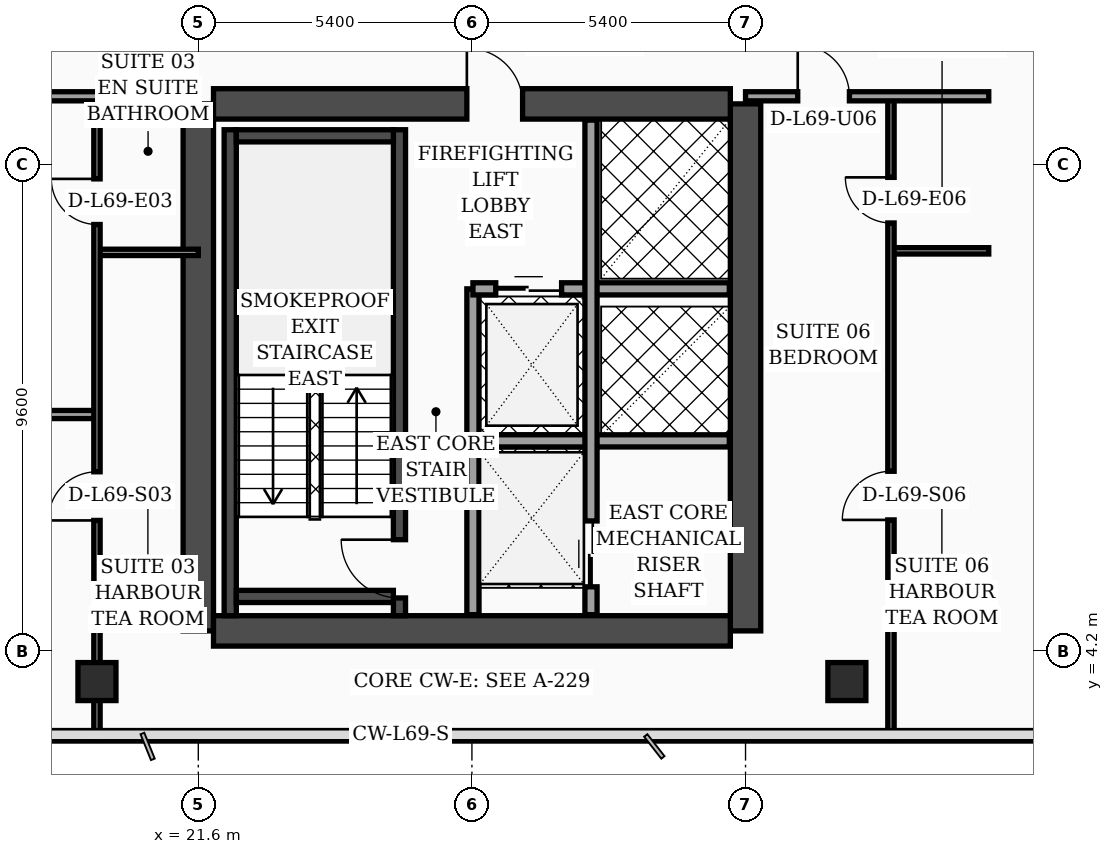
"""IFC4 building model, lengths in metres.
Left out: names, types, materials, properties, quantities, classifications, styles, units other than length and angle.
Written with IfcOpenShell. Run it as: python <this file> out.ifc"""

import sys

from ifc_helpers import new_model, si_unit, direction, frame, frame_2d, origin, origin_2d, place, context, subcontext, project, spatial, rectangle, hollow_rectangle, extrude, element, fill, save


model = new_model("IFC4")
c1 = context("Model", 3, precision=1e-05, world=origin(), true_north=direction((0.0, 1.0)))
c2 = subcontext(c1, "Body", "Model", "MODEL_VIEW")
j1 = project(units=[si_unit("LENGTHUNIT", "METRE"), si_unit("PLANEANGLEUNIT", "RADIAN")], contexts=[c1])
p1 = place(None, origin())
s1 = spatial("IfcSite", under=j1, at=p1, CompositionType="ELEMENT")
p2 = place(p1, origin())
s2 = spatial("IfcBuilding", under=s1, at=p2, CompositionType="ELEMENT")
p3 = place(p2, frame((0.0, 0.0, 278.7)))
s3 = spatial("IfcBuildingStorey", under=s2, at=p3, CompositionType="ELEMENT", Elevation=278.7)
for number, where, z_axis, x_axis in (
    (1, (21.6, 4.6, 0.0), (0.0, 0.0, 1.0), (0.0, 1.0, 0.0)),
    (2, (32.4, 4.6, 0.0), (0.0, 0.0, 1.0), (0.0, 1.0, 0.0)),
):
    element("IfcWall", number, at=place(p3, frame(where, z_axis=z_axis, x_axis=x_axis)), inside=s3, PredefinedType="SHEAR", context=c2, shape_type="SweptSolid", body=[
        extrude(rectangle(XDim=10.4, YDim=0.6, at=frame_2d((5.2, 0.0))), origin(), (0.0, 0.0, 1.0), 3.52),
    ])
p4 = place(p3, frame((21.9, 15.0, 0.0), z_axis=(0.0, 0.0, 1.0), x_axis=(1.0, 0.0, 0.0)))
e3 = element("IfcWall", 3, at=p4, inside=s3, PredefinedType="SHEAR", context=c2, shape_type="SweptSolid", body=[
    extrude(rectangle(XDim=10.2, YDim=0.6, at=frame_2d((5.1, 0.0))), origin(), (0.0, 0.0, 1.0), 3.52),
])
p5 = place(p4, frame((5.0, 0.0, 0.0)))
e4 = element("IfcOpeningElement", 4, at=p5, cuts=e3, PredefinedType="OPENING", context=c2, shape_type="SweptSolid", body=[
    extrude(rectangle(XDim=1.1, YDim=2.2, at=frame_2d((0.55, 1.1))), frame((0.0, 0.31, 0.0), z_axis=(0.0, -1.0, 0.0), x_axis=(1.0, 0.0, 0.0)), (0.0, 0.0, 1.0), 0.62),
])
p6 = place(p3, frame((21.9, 4.6, 0.0), z_axis=(0.0, 0.0, 1.0), x_axis=(1.0, 0.0, 0.0)))
e5 = element("IfcWall", 5, at=p6, inside=s3, PredefinedType="SHEAR", context=c2, shape_type="SweptSolid", body=[
    extrude(rectangle(XDim=10.2, YDim=0.6, at=frame_2d((5.1, 0.0))), origin(), (0.0, 0.0, 1.0), 3.52),
])
p7 = place(p3, frame((22.23, 4.9, 0.0), z_axis=(0.0, 0.0, 1.0), x_axis=(0.0, 1.0, 0.0)))
e6 = element("IfcWall", 6, at=p7, inside=s3, PredefinedType="SOLIDWALL", context=c2, shape_type="SweptSolid", body=[
    extrude(rectangle(XDim=9.59, YDim=0.24, at=frame_2d((4.795, 0.0))), origin(), (0.0, 0.0, 1.0), 3.52),
])
p8 = place(p3, frame((25.57, 4.9, 0.0), z_axis=(0.0, 0.0, 1.0), x_axis=(0.0, 1.0, 0.0)))
e7 = element("IfcWall", 7, at=p8, inside=s3, PredefinedType="SOLIDWALL", context=c2, shape_type="SweptSolid", body=[
    extrude(rectangle(XDim=9.59, YDim=0.24, at=frame_2d((4.795, 0.0))), origin(), (0.0, 0.0, 1.0), 3.52),
])
p9 = place(p8, frame((0.35, 0.0, 0.0)))
e8 = element("IfcOpeningElement", 8, at=p9, cuts=e7, PredefinedType="OPENING", context=c2, shape_type="SweptSolid", body=[
    extrude(rectangle(XDim=1.15, YDim=2.2, at=frame_2d((0.575, 1.1))), frame((0.0, 0.13, 0.0), z_axis=(0.0, -1.0, 0.0), x_axis=(1.0, 0.0, 0.0)), (0.0, 0.0, 1.0), 0.26),
])
for number, where, z_axis, x_axis in (
    (9, (22.35, 5.28, 0.0), (0.0, 0.0, 1.0), (1.0, 0.0, 0.0)),
    (10, (22.35, 14.37, 0.0), (0.0, 0.0, 1.0), (1.0, 0.0, 0.0)),
):
    element("IfcWall", number, at=place(p3, frame(where, z_axis=z_axis, x_axis=x_axis)), inside=s3, PredefinedType="SOLIDWALL", context=c2, shape_type="SweptSolid", body=[
        extrude(rectangle(XDim=3.1, YDim=0.24, at=frame_2d((1.55, 0.0))), origin(), (0.0, 0.0, 1.0), 3.52),
    ])
for number, where, z_axis, x_axis in (
    (11, (19.6, 3.6, 0.0), (0.0, 0.0, 1.0), (1.0, 0.0, 0.0)),
    (12, (34.4, 3.6, 0.0), (0.0, 0.0, 1.0), (1.0, 0.0, 0.0)),
):
    element("IfcColumn", number, at=place(p3, frame(where, z_axis=z_axis, x_axis=x_axis)), inside=s3, PredefinedType="COLUMN", context=c2, shape_type="SweptSolid", body=[
        extrude(hollow_rectangle(XDim=0.75, YDim=0.75, WallThickness=0.032, at=origin_2d()), origin(), (0.0, 0.0, 1.0), 3.52),
    ])
p10 = place(p3, frame((43.83, 5.505, 0.0), z_axis=(0.0, 0.0, 1.0), x_axis=(-0.300509063924, 0.953778958931, 0.0)))
e13 = element("IfcWall", 13, at=p10, inside=s3, PredefinedType="SOLIDWALL", context=c2, shape_type="SweptSolid", body=[
    extrude(rectangle(XDim=30.814, YDim=0.32, at=frame_2d((15.407, 0.0))), origin(), (0.0, 0.0, 1.0), 3.52),
])
p11 = place(p10, frame((18.796, 0.0, 0.0)))
e14 = element("IfcOpeningElement", 14, at=p11, cuts=e13, PredefinedType="OPENING", context=c2, shape_type="SweptSolid", body=[
    extrude(rectangle(XDim=1.4, YDim=2.25, at=frame_2d((0.7, 1.125))), frame((0.0, 0.17, 0.0), z_axis=(0.0, -1.0, 0.0), x_axis=(1.0, 0.0, 0.0)), (0.0, 0.0, 1.0), 0.34),
])
p12 = place(p10, frame((4.437, 0.0, 0.7)))
e15 = element("IfcOpeningElement", 15, at=p12, cuts=e13, PredefinedType="OPENING", context=c2, shape_type="SweptSolid", body=[
    extrude(rectangle(XDim=1.6, YDim=1.65, at=frame_2d((0.8, 0.825))), frame((0.0, 0.17, 0.0), z_axis=(0.0, -1.0, 0.0), x_axis=(1.0, 0.0, 0.0)), (0.0, 0.0, 1.0), 0.34),
])
p13 = place(p10, frame((9.889, 0.0, 0.7)))
e16 = element("IfcOpeningElement", 16, at=p13, cuts=e13, PredefinedType="OPENING", context=c2, shape_type="SweptSolid", body=[
    extrude(rectangle(XDim=1.6, YDim=1.65, at=frame_2d((0.8, 0.825))), frame((0.0, 0.17, 0.0), z_axis=(0.0, -1.0, 0.0), x_axis=(1.0, 0.0, 0.0)), (0.0, 0.0, 1.0), 0.34),
])
p14 = place(p10, frame((1.6, 0.0, 0.75)))
e17 = element("IfcOpeningElement", 17, at=p14, cuts=e13, PredefinedType="OPENING", context=c2, shape_type="SweptSolid", body=[
    extrude(rectangle(XDim=1.5, YDim=1.6, at=frame_2d((0.75, 0.8))), frame((0.0, 0.17, 0.0), z_axis=(0.0, -1.0, 0.0), x_axis=(1.0, 0.0, 0.0)), (0.0, 0.0, 1.0), 0.34),
])
p15 = place(p10, frame((7.8, 0.0, 0.75)))
e18 = element("IfcOpeningElement", 18, at=p15, cuts=e13, PredefinedType="OPENING", context=c2, shape_type="SweptSolid", body=[
    extrude(rectangle(XDim=1.5, YDim=1.6, at=frame_2d((0.75, 0.8))), frame((0.0, 0.17, 0.0), z_axis=(0.0, -1.0, 0.0), x_axis=(1.0, 0.0, 0.0)), (0.0, 0.0, 1.0), 0.34),
])
p16 = place(p10, frame((11.95, 0.0, 0.75)))
e19 = element("IfcOpeningElement", 19, at=p16, cuts=e13, PredefinedType="OPENING", context=c2, shape_type="SweptSolid", body=[
    extrude(rectangle(XDim=1.5, YDim=1.6, at=frame_2d((0.75, 0.8))), frame((0.0, 0.17, 0.0), z_axis=(0.0, -1.0, 0.0), x_axis=(1.0, 0.0, 0.0)), (0.0, 0.0, 1.0), 0.34),
])
p17 = place(p10, frame((14.0, 0.0, 0.75)))
e20 = element("IfcOpeningElement", 20, at=p17, cuts=e13, PredefinedType="OPENING", context=c2, shape_type="SweptSolid", body=[
    extrude(rectangle(XDim=1.5, YDim=1.6, at=frame_2d((0.75, 0.8))), frame((0.0, 0.17, 0.0), z_axis=(0.0, -1.0, 0.0), x_axis=(1.0, 0.0, 0.0)), (0.0, 0.0, 1.0), 0.34),
])
p18 = place(p10, frame((16.55, 0.0, 0.75)))
e21 = element("IfcOpeningElement", 21, at=p18, cuts=e13, PredefinedType="OPENING", context=c2, shape_type="SweptSolid", body=[
    extrude(rectangle(XDim=1.5, YDim=1.6, at=frame_2d((0.75, 0.8))), frame((0.0, 0.17, 0.0), z_axis=(0.0, -1.0, 0.0), x_axis=(1.0, 0.0, 0.0)), (0.0, 0.0, 1.0), 0.34),
])
p19 = place(p10, frame((20.75, 0.0, 0.75)))
e22 = element("IfcOpeningElement", 22, at=p19, cuts=e13, PredefinedType="OPENING", context=c2, shape_type="SweptSolid", body=[
    extrude(rectangle(XDim=1.5, YDim=1.6, at=frame_2d((0.75, 0.8))), frame((0.0, 0.17, 0.0), z_axis=(0.0, -1.0, 0.0), x_axis=(1.0, 0.0, 0.0)), (0.0, 0.0, 1.0), 0.34),
])
p20 = place(p10, frame((23.3, 0.0, 0.75)))
e23 = element("IfcOpeningElement", 23, at=p20, cuts=e13, PredefinedType="OPENING", context=c2, shape_type="SweptSolid", body=[
    extrude(rectangle(XDim=1.5, YDim=1.6, at=frame_2d((0.75, 0.8))), frame((0.0, 0.17, 0.0), z_axis=(0.0, -1.0, 0.0), x_axis=(1.0, 0.0, 0.0)), (0.0, 0.0, 1.0), 0.34),
])
p21 = place(p10, frame((26.4, 0.0, 0.75)))
e24 = element("IfcOpeningElement", 24, at=p21, cuts=e13, PredefinedType="OPENING", context=c2, shape_type="SweptSolid", body=[
    extrude(rectangle(XDim=1.5, YDim=1.6, at=frame_2d((0.75, 0.8))), frame((0.0, 0.17, 0.0), z_axis=(0.0, -1.0, 0.0), x_axis=(1.0, 0.0, 0.0)), (0.0, 0.0, 1.0), 0.34),
])
p22 = place(p3, frame((27.02, 4.92, 0.0), z_axis=(0.0, 0.0, 1.0), x_axis=(0.0, 1.0, 0.0)))
e25 = element("IfcWall", 25, at=p22, inside=s3, PredefinedType="SOLIDWALL", context=c2, shape_type="SweptSolid", body=[
    extrude(rectangle(XDim=6.43, YDim=0.24, at=frame_2d((3.215, 0.0))), origin(), (0.0, 0.0, 1.0), 3.52),
])
p23 = place(p3, frame((27.02, 11.35, 0.0), z_axis=(0.0, 0.0, 1.0), x_axis=(1.0, 0.0, 0.0)))
e26 = element("IfcWall", 26, at=p23, inside=s3, PredefinedType="SOLIDWALL", context=c2, shape_type="SweptSolid", body=[
    extrude(rectangle(XDim=5.06, YDim=0.24, at=frame_2d((2.53, 0.0))), origin(), (0.0, 0.0, 1.0), 3.52),
])
p24 = place(p23, frame((0.45, 0.0, 0.0)))
e27 = element("IfcOpeningElement", 27, at=p24, cuts=e26, PredefinedType="OPENING", context=c2, shape_type="SweptSolid", body=[
    extrude(rectangle(XDim=1.3, YDim=2.35, at=frame_2d((0.65, 1.175))), frame((0.0, 0.13, 0.0), z_axis=(0.0, -1.0, 0.0), x_axis=(1.0, 0.0, 0.0)), (0.0, 0.0, 1.0), 0.26),
])
p25 = place(p3, frame((27.02, 8.35, 0.0), z_axis=(0.0, 0.0, 1.0), x_axis=(1.0, 0.0, 0.0)))
e28 = element("IfcWall", 28, at=p25, inside=s3, PredefinedType="SOLIDWALL", context=c2, shape_type="SweptSolid", body=[
    extrude(rectangle(XDim=5.06, YDim=0.24, at=frame_2d((2.53, 0.0))), origin(), (0.0, 0.0, 1.0), 3.52),
])
p26 = place(p3, frame((29.35, 4.92, 0.0), z_axis=(0.0, 0.0, 1.0), x_axis=(0.0, 1.0, 0.0)))
e29 = element("IfcWall", 29, at=p26, inside=s3, PredefinedType="SOLIDWALL", context=c2, shape_type="SweptSolid", body=[
    extrude(rectangle(XDim=9.76, YDim=0.24, at=frame_2d((4.88, 0.0))), origin(), (0.0, 0.0, 1.0), 3.52),
])
p27 = place(p26, frame((0.55, 0.0, 0.0)))
e30 = element("IfcOpeningElement", 30, at=p27, cuts=e29, PredefinedType="OPENING", context=c2, shape_type="SweptSolid", body=[
    extrude(rectangle(XDim=1.3, YDim=2.35, at=frame_2d((0.65, 1.175))), frame((0.0, 0.13, 0.0), z_axis=(0.0, -1.0, 0.0), x_axis=(1.0, 0.0, 0.0)), (0.0, 0.0, 1.0), 0.26),
])
p28 = place(p3, frame((19.6, 12.07, 0.0), z_axis=(0.0, 0.0, 1.0), x_axis=(1.0, 0.0, 0.0)))
e31 = element("IfcWall", 31, at=p28, inside=s3, PredefinedType="PARTITIONING", context=c2, shape_type="SweptSolid", body=[
    extrude(rectangle(XDim=2.0, YDim=0.125, at=frame_2d((1.0, 0.0))), origin(), (0.0, 0.0, 1.0), 3.52),
])
p29 = place(p3, frame((15.15, 8.87, 0.0), z_axis=(0.0, 0.0, 1.0), x_axis=(1.0, 0.0, 0.0)))
e32 = element("IfcWall", 32, at=p29, inside=s3, PredefinedType="PARTITIONING", context=c2, shape_type="SweptSolid", body=[
    extrude(rectangle(XDim=4.45, YDim=0.16, at=frame_2d((2.225, 0.0))), origin(), (0.0, 0.0, 1.0), 3.52),
])
p30 = place(p29, frame((1.75, 0.0, 0.0)))
e33 = element("IfcOpeningElement", 33, at=p30, cuts=e32, PredefinedType="OPENING", context=c2, shape_type="SweptSolid", body=[
    extrude(rectangle(XDim=0.96, YDim=2.2, at=frame_2d((0.48, 1.1))), frame((0.0, 0.09, 0.0), z_axis=(0.0, -1.0, 0.0), x_axis=(1.0, 0.0, 0.0)), (0.0, 0.0, 1.0), 0.18),
])
p31 = place(p3, frame((19.6, 2.44, 0.0), z_axis=(0.0, 0.0, 1.0), x_axis=(0.0, 1.0, 0.0)))
e34 = element("IfcWall", 34, at=p31, inside=s3, PredefinedType="PARTITIONING", context=c2, shape_type="SweptSolid", body=[
    extrude(rectangle(XDim=12.71, YDim=0.125, at=frame_2d((6.355, 0.0))), origin(), (0.0, 0.0, 1.0), 2.57),
])
p32 = place(p31, frame((4.34, 0.0, 0.0)))
e35 = element("IfcOpeningElement", 35, at=p32, cuts=e34, PredefinedType="OPENING", context=c2, shape_type="SweptSolid", body=[
    extrude(rectangle(XDim=0.96, YDim=2.2, at=frame_2d((0.48, 1.1))), frame((0.0, 0.073, 0.0), z_axis=(0.0, -1.0, 0.0), x_axis=(1.0, 0.0, 0.0)), (0.0, 0.0, 1.0), 0.145),
])
p33 = place(p31, frame((10.18, 0.0, 0.0)))
e36 = element("IfcOpeningElement", 36, at=p33, cuts=e34, PredefinedType="OPENING", context=c2, shape_type="SweptSolid", body=[
    extrude(rectangle(XDim=0.9, YDim=2.15, at=frame_2d((0.45, 1.075))), frame((0.0, 0.073, 0.0), z_axis=(0.0, -1.0, 0.0), x_axis=(1.0, 0.0, 0.0)), (0.0, 0.0, 1.0), 0.145),
])
p34 = place(p3, frame((15.15, 15.15, 0.0), z_axis=(0.0, 0.0, 1.0), x_axis=(1.0, 0.0, 0.0)))
e37 = element("IfcWall", 37, at=p34, inside=s3, PredefinedType="PARTITIONING", context=c2, shape_type="SweptSolid", body=[
    extrude(rectangle(XDim=6.45, YDim=0.18, at=frame_2d((3.225, 0.0))), origin(), (0.0, 0.0, 1.0), 2.57),
])
p35 = place(p34, frame((1.74, 0.0, 0.0)))
e38 = element("IfcOpeningElement", 38, at=p35, cuts=e37, PredefinedType="OPENING", context=c2, shape_type="SweptSolid", body=[
    extrude(rectangle(XDim=1.02, YDim=2.2, at=frame_2d((0.51, 1.1))), frame((0.0, 0.1, 0.0), z_axis=(0.0, -1.0, 0.0), x_axis=(1.0, 0.0, 0.0)), (0.0, 0.0, 1.0), 0.2),
])
p36 = place(p3, frame((35.27, 12.1, 0.0), z_axis=(0.0, 0.0, 1.0), x_axis=(1.0, 0.0, 0.0)))
e39 = element("IfcWall", 39, at=p36, inside=s3, PredefinedType="PARTITIONING", context=c2, shape_type="SweptSolid", body=[
    extrude(rectangle(XDim=1.93, YDim=0.125, at=frame_2d((0.965, 0.0))), origin(), (0.0, 0.0, 1.0), 3.52),
])
p37 = place(p3, frame((35.27, 2.44, 0.0), z_axis=(0.0, 0.0, 1.0), x_axis=(0.0, 1.0, 0.0)))
e40 = element("IfcWall", 40, at=p37, inside=s3, PredefinedType="PARTITIONING", context=c2, shape_type="SweptSolid", body=[
    extrude(rectangle(XDim=12.71, YDim=0.125, at=frame_2d((6.355, 0.0))), origin(), (0.0, 0.0, 1.0), 2.97),
])
p38 = place(p37, frame((4.35, 0.0, 0.0)))
e41 = element("IfcOpeningElement", 41, at=p38, cuts=e40, PredefinedType="OPENING", context=c2, shape_type="SweptSolid", body=[
    extrude(rectangle(XDim=0.96, YDim=2.2, at=frame_2d((0.48, 1.1))), frame((0.0, 0.073, 0.0), z_axis=(0.0, -1.0, 0.0), x_axis=(1.0, 0.0, 0.0)), (0.0, 0.0, 1.0), 0.145),
])
p39 = place(p37, frame((10.21, 0.0, 0.0)))
e42 = element("IfcOpeningElement", 42, at=p39, cuts=e40, PredefinedType="OPENING", context=c2, shape_type="SweptSolid", body=[
    extrude(rectangle(XDim=0.9, YDim=2.15, at=frame_2d((0.45, 1.075))), frame((0.0, 0.073, 0.0), z_axis=(0.0, -1.0, 0.0), x_axis=(1.0, 0.0, 0.0)), (0.0, 0.0, 1.0), 0.145),
])
p40 = place(p3, frame((32.4, 15.15, 0.0), z_axis=(0.0, 0.0, 1.0), x_axis=(1.0, 0.0, 0.0)))
e43 = element("IfcWall", 43, at=p40, inside=s3, PredefinedType="PARTITIONING", context=c2, shape_type="SweptSolid", body=[
    extrude(rectangle(XDim=4.8, YDim=0.18, at=frame_2d((2.4, 0.0))), origin(), (0.0, 0.0, 1.0), 2.97),
])
p41 = place(p40, frame((1.03, 0.0, 0.0)))
e44 = element("IfcOpeningElement", 44, at=p41, cuts=e43, PredefinedType="OPENING", context=c2, shape_type="SweptSolid", body=[
    extrude(rectangle(XDim=1.02, YDim=2.2, at=frame_2d((0.51, 1.1))), frame((0.0, 0.1, 0.0), z_axis=(0.0, -1.0, 0.0), x_axis=(1.0, 0.0, 0.0)), (0.0, 0.0, 1.0), 0.2),
])
p42 = place(p24, origin())
e45 = element("IfcDoor", 45, at=p42, inside=s3, OperationType="DOUBLE_DOOR_SLIDING", PredefinedType="DOOR", context=c2, shape_type="SweptSolid", body=[
    extrude(rectangle(XDim=1.3, YDim=2.35, at=frame_2d((0.65, 1.175))), frame((0.0, 0.025, 0.0), z_axis=(0.0, -1.0, 0.0), x_axis=(1.0, 0.0, 0.0)), (0.0, 0.0, 1.0), 0.05),
])
fill(e27, e45)
p43 = place(p27, origin())
e46 = element("IfcDoor", 46, at=p43, inside=s3, OperationType="DOUBLE_DOOR_SLIDING", PredefinedType="DOOR", context=c2, shape_type="SweptSolid", body=[
    extrude(rectangle(XDim=1.3, YDim=2.35, at=frame_2d((0.65, 1.175))), frame((0.0, 0.025, 0.0), z_axis=(0.0, -1.0, 0.0), x_axis=(1.0, 0.0, 0.0)), (0.0, 0.0, 1.0), 0.05),
])
fill(e30, e46)
p44 = place(p32, origin())
e47 = element("IfcDoor", 47, at=p44, inside=s3, OperationType="SINGLE_SWING_LEFT", PredefinedType="DOOR", context=c2, shape_type="SweptSolid", body=[
    extrude(rectangle(XDim=0.96, YDim=2.2, at=frame_2d((0.48, 1.1))), frame((0.0, 0.025, 0.0), z_axis=(0.0, -1.0, 0.0), x_axis=(1.0, 0.0, 0.0)), (0.0, 0.0, 1.0), 0.05),
])
fill(e35, e47)
p45 = place(p33, origin())
e48 = element("IfcDoor", 48, at=p45, inside=s3, OperationType="SINGLE_SWING_RIGHT", PredefinedType="DOOR", context=c2, shape_type="SweptSolid", body=[
    extrude(rectangle(XDim=0.9, YDim=2.15, at=frame_2d((0.45, 1.075))), frame((0.0, 0.025, 0.0), z_axis=(0.0, -1.0, 0.0), x_axis=(1.0, 0.0, 0.0)), (0.0, 0.0, 1.0), 0.05),
])
fill(e36, e48)
p46 = place(p38, origin())
e49 = element("IfcDoor", 49, at=p46, inside=s3, OperationType="SINGLE_SWING_LEFT", PredefinedType="DOOR", context=c2, shape_type="SweptSolid", body=[
    extrude(rectangle(XDim=0.96, YDim=2.2, at=frame_2d((0.48, 1.1))), frame((0.0, 0.025, 0.0), z_axis=(0.0, -1.0, 0.0), x_axis=(1.0, 0.0, 0.0)), (0.0, 0.0, 1.0), 0.05),
])
fill(e41, e49)
p47 = place(p39, origin())
e50 = element("IfcDoor", 50, at=p47, inside=s3, OperationType="SINGLE_SWING_RIGHT", PredefinedType="DOOR", context=c2, shape_type="SweptSolid", body=[
    extrude(rectangle(XDim=0.9, YDim=2.15, at=frame_2d((0.45, 1.075))), frame((0.0, 0.025, 0.0), z_axis=(0.0, -1.0, 0.0), x_axis=(1.0, 0.0, 0.0)), (0.0, 0.0, 1.0), 0.05),
])
fill(e42, e50)
p48 = place(p41, origin())
e51 = element("IfcDoor", 51, at=p48, inside=s3, OperationType="SINGLE_SWING_LEFT", PredefinedType="DOOR", context=c2, shape_type="SweptSolid", body=[
    extrude(rectangle(XDim=1.02, YDim=2.2, at=frame_2d((0.51, 1.1))), frame((0.0, 0.025, 0.0), z_axis=(0.0, -1.0, 0.0), x_axis=(1.0, 0.0, 0.0)), (0.0, 0.0, 1.0), 0.05),
])
fill(e44, e51)
p49 = place(p9, origin())
e52 = element("IfcDoor", 52, at=p49, inside=s3, OperationType="SINGLE_SWING_RIGHT", PredefinedType="DOOR", context=c2, shape_type="SweptSolid", body=[
    extrude(rectangle(XDim=1.15, YDim=2.2, at=frame_2d((0.575, 1.1))), frame((0.0, 0.025, 0.0), z_axis=(0.0, -1.0, 0.0), x_axis=(1.0, 0.0, 0.0)), (0.0, 0.0, 1.0), 0.05),
])
fill(e8, e52)
p50 = place(p5, origin())
e53 = element("IfcDoor", 53, at=p50, inside=s3, OperationType="SINGLE_SWING_LEFT", PredefinedType="DOOR", context=c2, shape_type="SweptSolid", body=[
    extrude(rectangle(XDim=1.1, YDim=2.2, at=frame_2d((0.55, 1.1))), frame((0.0, 0.025, 0.0), z_axis=(0.0, -1.0, 0.0), x_axis=(1.0, 0.0, 0.0)), (0.0, 0.0, 1.0), 0.05),
])
fill(e4, e53)
save(model, sys.argv[1])
